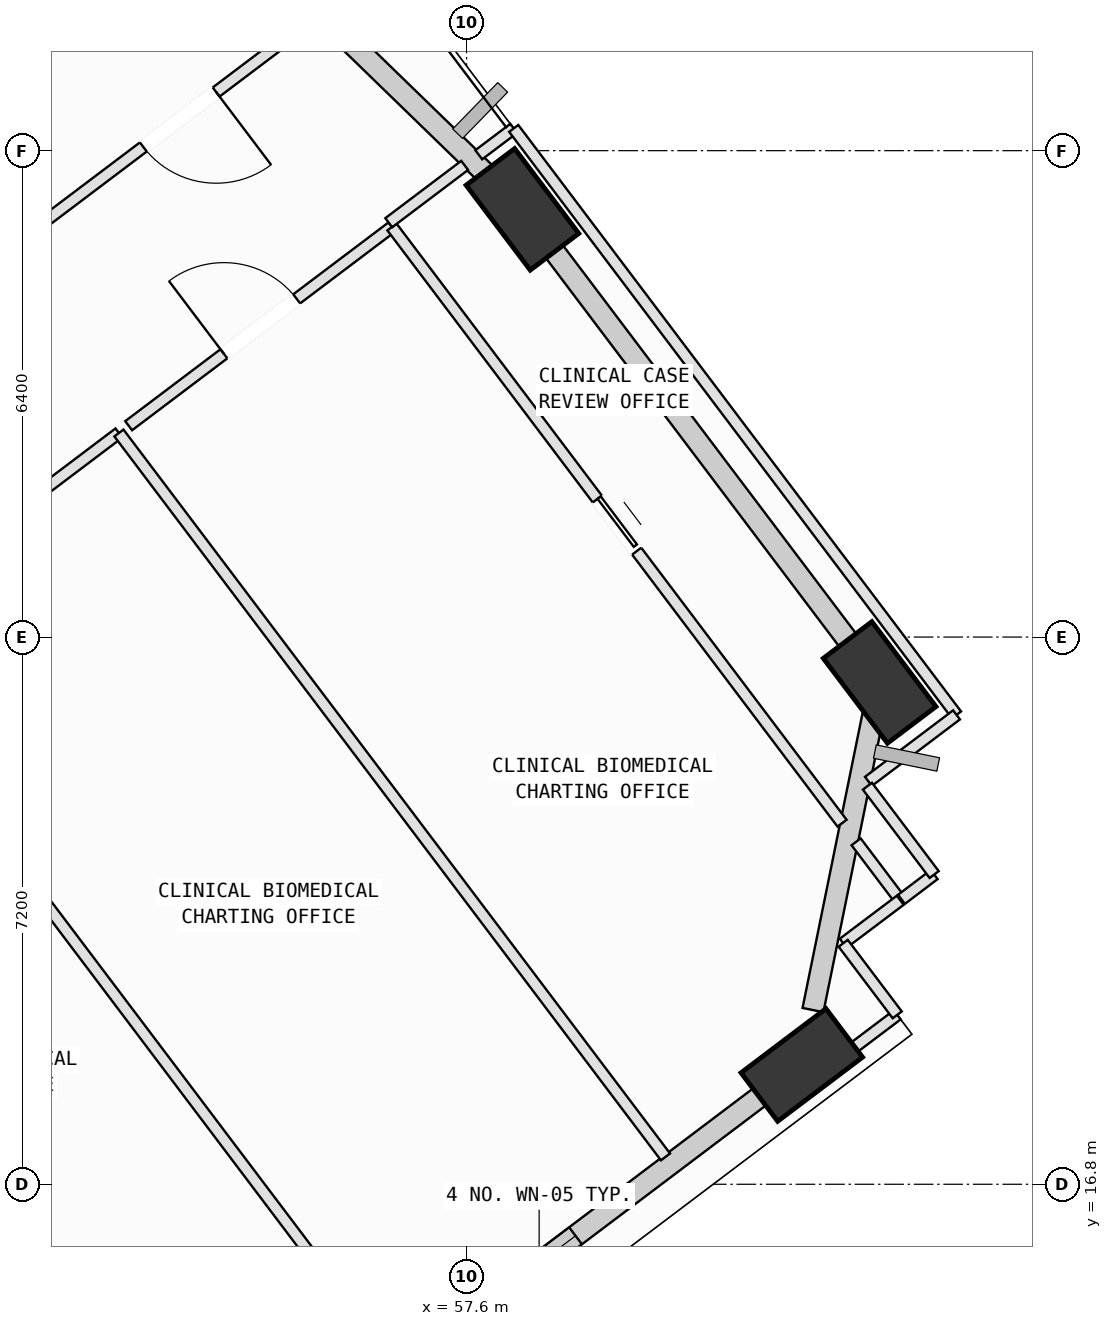
"""IFC4 building model, lengths in metres.
Left out: names, types, materials, properties, quantities, classifications, styles, units other than length and angle.
Written with IfcOpenShell. Run it as: python <this file> out.ifc"""

import sys

from ifc_helpers import new_model, si_unit, direction, frame, frame_2d, origin, origin_2d, place, context, subcontext, project, spatial, rectangle, extrude, element, fill, save


model = new_model("IFC4")
c1 = context("Model", 3, precision=1e-05, world=origin(), true_north=direction((0.0, 1.0)))
c2 = subcontext(c1, "Body", "Model", "MODEL_VIEW")
j1 = project(units=[si_unit("LENGTHUNIT", "METRE"), si_unit("PLANEANGLEUNIT", "RADIAN")], contexts=[c1])
p1 = place(None, origin())
s1 = spatial("IfcSite", under=j1, at=p1, CompositionType="ELEMENT")
p2 = place(p1, origin())
s2 = spatial("IfcBuilding", under=s1, at=p2, CompositionType="ELEMENT")
p3 = place(p2, frame((0.0, 0.0, 181.8)))
s3 = spatial("IfcBuildingStorey", under=s2, at=p3, CompositionType="ELEMENT", Elevation=181.8)
p4 = place(p3, frame((62.01, 18.369, 0.002), z_axis=(0.025473116254, 0.117176334771, 0.992784380879), x_axis=(-0.906962067297, -0.414969728359, 0.072249104005)))
e1 = element("IfcColumn", 1, at=p4, inside=s3, PredefinedType="COLUMN", context=c2, shape_type="SweptSolid", body=[
    extrude(rectangle(XDim=1.4, YDim=0.8, at=origin_2d()), origin(), (0.0, 0.0, 1.0), 4.025),
])
p5 = place(p3, frame((63.035, 23.403, 0.002), z_axis=(0.004729946846, 0.121159407662, 0.992621793806), x_axis=(0.571149109369, -0.815121976711, 0.09677219616)))
e2 = element("IfcColumn", 2, at=p5, inside=s3, PredefinedType="COLUMN", context=c2, shape_type="SweptSolid", body=[
    extrude(rectangle(XDim=1.4, YDim=0.8, at=origin_2d()), origin(), (0.0, 0.0, 1.0), 4.026),
])
p6 = place(p3, frame((58.335, 29.628, 0.002), z_axis=(-0.02078000134, 0.101834158611, 0.994584333118), x_axis=(0.749053879138, -0.657295694235, 0.082949722659)))
e3 = element("IfcColumn", 3, at=p6, inside=s3, PredefinedType="COLUMN", context=c2, shape_type="SweptSolid", body=[
    extrude(rectangle(XDim=1.4, YDim=0.8, at=origin_2d()), origin(), (0.0, 0.0, 1.0), 4.018),
])
p7 = place(p3, frame((61.781, 18.196, 0.0), z_axis=(0.0, 0.0, 1.0), x_axis=(-0.798123503481, -0.602493878136, 0.0)))
e4 = element("IfcWall", 4, at=p7, inside=s3, PredefinedType="SOLIDWALL", context=c2, shape_type="SweptSolid", body=[
    extrude(rectangle(XDim=6.242, YDim=0.28, at=frame_2d((3.121, 0.0))), origin(), (0.0, 0.0, 1.0), 3.265),
])
p8 = place(p7, frame((3.442, 0.0, 0.75)))
e5 = element("IfcOpeningElement", 5, at=p8, cuts=e4, PredefinedType="OPENING", context=c2, shape_type="SweptSolid", body=[
    extrude(rectangle(XDim=1.2, YDim=1.75, at=frame_2d((0.6, 0.875))), frame((0.0, 0.15, 0.0), z_axis=(0.0, -1.0, 0.0), x_axis=(1.0, 0.0, 0.0)), (0.0, 0.0, 1.0), 0.3),
])
p9 = place(p3, frame((62.984, 23.154, 0.0), z_axis=(0.0, 0.0, 1.0), x_axis=(-0.199365708504, -0.979925157485, 0.0)))
e6 = element("IfcWall", 6, at=p9, inside=s3, PredefinedType="SOLIDWALL", context=c2, shape_type="SweptSolid", body=[
    extrude(rectangle(XDim=4.145, YDim=0.28, at=frame_2d((2.073, 0.0))), origin(), (0.0, 0.0, 1.0), 3.265),
])
p10 = place(p3, frame((58.515, 29.389, 0.0), z_axis=(0.0, 0.0, 1.0), x_axis=(0.602492713857, -0.79812438238, 0.0)))
e7 = element("IfcWall", 7, at=p10, inside=s3, PredefinedType="SOLIDWALL", context=c2, shape_type="SweptSolid", body=[
    extrude(rectangle(XDim=6.84, YDim=0.28, at=frame_2d((3.42, 0.0))), origin(), (0.0, 0.0, 1.0), 3.265),
])
p11 = place(p3, frame((51.525, 36.24, 0.0), z_axis=(0.0, 0.0, 1.0), x_axis=(0.717404025955, -0.696657350169, 0.0)))
e8 = element("IfcWall", 8, at=p11, inside=s3, PredefinedType="SOLIDWALL", context=c2, shape_type="SweptSolid", body=[
    extrude(rectangle(XDim=8.838, YDim=0.28, at=frame_2d((4.419, 0.0))), origin(), (0.0, 0.0, 1.0), 3.265),
])
p12 = place(p3, frame((45.843, 21.262, 0.0), z_axis=(0.0, 0.0, 1.0), x_axis=(0.602530343885, -0.798095974616, 0.0)))
e9 = element("IfcWall", 9, at=p12, inside=s3, PredefinedType="PARTITIONING", context=c2, shape_type="SweptSolid", body=[
    extrude(rectangle(XDim=11.935, YDim=0.15, at=frame_2d((5.967, 0.0))), origin(), (0.0, 0.0, 1.0), 3.415),
])
p13 = place(p3, frame((49.435, 23.974, 0.0), z_axis=(0.0, 0.0, 1.0), x_axis=(0.60250679657, -0.798113751346, 0.0)))
e10 = element("IfcWall", 10, at=p13, inside=s3, PredefinedType="PARTITIONING", context=c2, shape_type="SweptSolid", body=[
    extrude(rectangle(XDim=12.28, YDim=0.15, at=frame_2d((6.14, 0.0))), origin(), (0.0, 0.0, 1.0), 3.78),
])
p14 = place(p3, frame((49.562, 24.07, 0.0), z_axis=(0.0, 0.0, 1.0), x_axis=(0.798105957369, 0.602517120763, 0.0)))
e11 = element("IfcWall", 11, at=p14, inside=s3, PredefinedType="PARTITIONING", context=c2, shape_type="SweptSolid", body=[
    extrude(rectangle(XDim=4.34, YDim=0.15, at=frame_2d((2.17, 0.0))), origin(), (0.0, 0.0, 1.0), 3.065),
])
p15 = place(p14, frame((1.57, 0.0, 0.0)))
e12 = element("IfcOpeningElement", 12, at=p15, cuts=e11, PredefinedType="OPENING", context=c2, shape_type="SweptSolid", body=[
    extrude(rectangle(XDim=1.2, YDim=2.15, at=frame_2d((0.6, 1.075))), frame((0.0, 0.085, 0.0), z_axis=(0.0, -1.0, 0.0), x_axis=(1.0, 0.0, 0.0)), (0.0, 0.0, 1.0), 0.17),
])
p16 = place(p3, frame((53.026, 26.685, 0.0), z_axis=(0.0, 0.0, 1.0), x_axis=(0.602533536667, -0.798093564184, 0.0)))
e13 = element("IfcWall", 13, at=p16, inside=s3, PredefinedType="PARTITIONING", context=c2, shape_type="SweptSolid", body=[
    extrude(rectangle(XDim=11.935, YDim=0.15, at=frame_2d((5.967, 0.0))), origin(), (0.0, 0.0, 1.0), 3.78),
])
p17 = place(p3, frame((63.266, 19.029, 0.0), z_axis=(0.0, 0.0, 1.0), x_axis=(-0.798365007662, -0.602173824191, 0.0)))
e14 = element("IfcWall", 14, at=p17, inside=s3, PredefinedType="PARTITIONING", context=c2, shape_type="SweptSolid", body=[
    extrude(rectangle(XDim=1.688, YDim=0.15, at=frame_2d((0.844, 0.0))), origin(), (0.0, 0.0, 1.0), 3.78),
])
p18 = place(p3, frame((53.154, 26.781, 0.0), z_axis=(0.0, 0.0, 1.0), x_axis=(0.798105957369, 0.602517120763, 0.0)))
e15 = element("IfcWall", 15, at=p18, inside=s3, PredefinedType="PARTITIONING", context=c2, shape_type="SweptSolid", body=[
    extrude(rectangle(XDim=4.34, YDim=0.15, at=frame_2d((2.17, 0.0))), origin(), (0.0, 0.0, 1.0), 3.065),
])
p19 = place(p18, frame((1.57, 0.0, 0.0)))
e16 = element("IfcOpeningElement", 16, at=p19, cuts=e15, PredefinedType="OPENING", context=c2, shape_type="SweptSolid", body=[
    extrude(rectangle(XDim=1.2, YDim=2.15, at=frame_2d((0.6, 1.075))), frame((0.0, 0.085, 0.0), z_axis=(0.0, -1.0, 0.0), x_axis=(1.0, 0.0, 0.0)), (0.0, 0.0, 1.0), 0.17),
])
p20 = place(p3, frame((56.618, 29.396, 0.0), z_axis=(0.0, 0.0, 1.0), x_axis=(0.602496773162, -0.798121318053, 0.0)))
e17 = element("IfcWall", 17, at=p20, inside=s3, PredefinedType="PARTITIONING", context=c2, shape_type="SweptSolid", body=[
    extrude(rectangle(XDim=9.829, YDim=0.15, at=frame_2d((4.915, 0.0))), origin(), (0.0, 0.0, 1.0), 3.78),
])
p21 = place(p20, frame((4.485, 0.0, 0.0)))
e18 = element("IfcOpeningElement", 18, at=p21, cuts=e17, PredefinedType="OPENING", context=c2, shape_type="SweptSolid", body=[
    extrude(rectangle(XDim=0.86, YDim=2.06, at=frame_2d((0.43, 1.03))), frame((0.0, 0.085, 0.0), z_axis=(0.0, -1.0, 0.0), x_axis=(1.0, 0.0, 0.0)), (0.0, 0.0, 1.0), 0.17),
])
p22 = place(p3, frame((62.725, 21.306, 0.0), z_axis=(0.0, 0.0, 1.0), x_axis=(0.60279365945, -0.797897113748, 0.0)))
e19 = element("IfcWall", 19, at=p22, inside=s3, PredefinedType="PARTITIONING", context=c2, shape_type="SweptSolid", body=[
    extrude(rectangle(XDim=0.964, YDim=0.15, at=frame_2d((0.482, 0.0))), origin(), (0.0, 0.0, 1.0), 3.78),
])
p23 = place(p3, frame((63.306, 20.537, 0.0), z_axis=(0.0, 0.0, 1.0), x_axis=(-0.798502270997, -0.601991796633, 0.0)))
e20 = element("IfcWall", 20, at=p23, inside=s3, PredefinedType="PARTITIONING", context=c2, shape_type="SweptSolid", body=[
    extrude(rectangle(XDim=0.94, YDim=0.15, at=frame_2d((0.47, 0.0))), origin(), (0.0, 0.0, 1.0), 3.78),
])
p24 = place(p3, frame((62.555, 19.971, 0.0), z_axis=(0.0, 0.0, 1.0), x_axis=(0.602578468566, -0.79805964014, 0.0)))
e21 = element("IfcWall", 21, at=p24, inside=s3, PredefinedType="PARTITIONING", context=c2, shape_type="SweptSolid", body=[
    extrude(rectangle(XDim=1.18, YDim=0.15, at=frame_2d((0.59, 0.0))), origin(), (0.0, 0.0, 1.0), 3.78),
])
p25 = place(p3, frame((55.585, 32.138, 0.0), z_axis=(0.0, 0.0, 1.0), x_axis=(-0.798095178634, -0.60253139822, 0.0)))
e22 = element("IfcWall", 22, at=p25, inside=s3, PredefinedType="PARTITIONING", context=c2, shape_type="SweptSolid", body=[
    extrude(rectangle(XDim=4.408, YDim=0.15, at=frame_2d((2.204, 0.0))), origin(), (0.0, 0.0, 1.0), 3.78),
])
p26 = place(p25, frame((1.604, 0.0, 0.0)))
e23 = element("IfcOpeningElement", 23, at=p26, cuts=e22, PredefinedType="OPENING", context=c2, shape_type="SweptSolid", body=[
    extrude(rectangle(XDim=1.2, YDim=2.15, at=frame_2d((0.6, 1.075))), frame((0.0, 0.085, 0.0), z_axis=(0.0, -1.0, 0.0), x_axis=(1.0, 0.0, 0.0)), (0.0, 0.0, 1.0), 0.17),
])
p27 = place(p3, frame((63.752, 20.875, 0.0), z_axis=(0.0, 0.0, 1.0), x_axis=(-0.796894093215, -0.604119031483, 0.0)))
e24 = element("IfcWall", 24, at=p27, inside=s3, PredefinedType="PARTITIONING", context=c2, shape_type="SweptSolid", body=[
    extrude(rectangle(XDim=0.54, YDim=0.15, at=frame_2d((0.27, 0.0))), origin(), (0.0, 0.0, 1.0), 3.78),
])
p28 = place(p3, frame((56.576, 29.452, 0.0), z_axis=(0.0, 0.0, 1.0), x_axis=(0.798123673532, 0.602493652869, 0.0)))
e25 = element("IfcWall", 25, at=p28, inside=s3, PredefinedType="PARTITIONING", context=c2, shape_type="SweptSolid", body=[
    extrude(rectangle(XDim=1.252, YDim=0.15, at=frame_2d((0.626, 0.0))), origin(), (0.0, 0.0, 1.0), 3.065),
])
p29 = place(p3, frame((57.76, 30.346, 0.0), z_axis=(0.0, 0.0, 1.0), x_axis=(0.798166088463, 0.602437461674, 0.0)))
e26 = element("IfcWall", 26, at=p29, inside=s3, PredefinedType="PARTITIONING", context=c2, shape_type="SweptSolid", body=[
    extrude(rectangle(XDim=0.576, YDim=0.15, at=frame_2d((0.288, 0.0))), origin(), (0.0, 0.0, 1.0), 3.78),
])
p30 = place(p3, frame((58.22, 30.693, 0.0), z_axis=(0.0, 0.0, 1.0), x_axis=(0.60252193275, -0.798102324615, 0.0)))
e27 = element("IfcWall", 27, at=p30, inside=s3, PredefinedType="PARTITIONING", context=c2, shape_type="SweptSolid", body=[
    extrude(rectangle(XDim=9.669, YDim=0.15, at=frame_2d((4.834, 0.0))), origin(), (0.0, 0.0, 1.0), 3.265),
])
p31 = place(p3, frame((64.046, 22.976, 0.0), z_axis=(0.0, 0.0, 1.0), x_axis=(-0.798079317633, -0.602552406656, 0.0)))
e28 = element("IfcWall", 28, at=p31, inside=s3, PredefinedType="PARTITIONING", context=c2, shape_type="SweptSolid", body=[
    extrude(rectangle(XDim=1.452, YDim=0.15, at=frame_2d((0.726, 0.0))), origin(), (0.0, 0.0, 1.0), 3.78),
])
p32 = place(p3, frame((62.874, 22.038, 0.0), z_axis=(0.0, 0.0, 1.0), x_axis=(0.602463294748, -0.798146589594, 0.0)))
e29 = element("IfcWall", 29, at=p32, inside=s3, PredefinedType="PARTITIONING", context=c2, shape_type="SweptSolid", body=[
    extrude(rectangle(XDim=1.457, YDim=0.15, at=frame_2d((0.729, 0.0))), origin(), (0.0, 0.0, 1.0), 3.78),
])
p33 = place(p8, origin())
e30 = element("IfcWindow", 30, at=p33, inside=s3, PartitioningType="SINGLE_PANEL", PredefinedType="WINDOW", context=c2, shape_type="SweptSolid", body=[
    extrude(rectangle(XDim=1.2, YDim=1.75, at=frame_2d((0.6, 0.875))), frame((0.0, 0.03, 0.0), z_axis=(0.0, -1.0, 0.0), x_axis=(1.0, 0.0, 0.0)), (0.0, 0.0, 1.0), 0.06),
])
fill(e5, e30)
p34 = place(p19, origin())
e31 = element("IfcDoor", 31, at=p34, inside=s3, OperationType="SINGLE_SWING_LEFT", PredefinedType="DOOR", context=c2, shape_type="SweptSolid", body=[
    extrude(rectangle(XDim=1.2, YDim=2.15, at=frame_2d((0.6, 1.075))), frame((0.0, 0.025, 0.0), z_axis=(0.0, -1.0, 0.0), x_axis=(1.0, 0.0, 0.0)), (0.0, 0.0, 1.0), 0.05),
])
fill(e16, e31)
p35 = place(p26, origin())
e32 = element("IfcDoor", 32, at=p35, inside=s3, OperationType="SINGLE_SWING_LEFT", PredefinedType="DOOR", context=c2, shape_type="SweptSolid", body=[
    extrude(rectangle(XDim=1.2, YDim=2.15, at=frame_2d((0.6, 1.075))), frame((0.0, 0.025, 0.0), z_axis=(0.0, -1.0, 0.0), x_axis=(1.0, 0.0, 0.0)), (0.0, 0.0, 1.0), 0.05),
])
fill(e23, e32)
p36 = place(p21, origin())
e33 = element("IfcDoor", 33, at=p36, inside=s3, OperationType="SLIDING_TO_LEFT", PredefinedType="DOOR", context=c2, shape_type="SweptSolid", body=[
    extrude(rectangle(XDim=0.86, YDim=2.06, at=frame_2d((0.43, 1.03))), frame((0.0, 0.025, 0.0), z_axis=(0.0, -1.0, 0.0), x_axis=(1.0, 0.0, 0.0)), (0.0, 0.0, 1.0), 0.05),
])
fill(e18, e33)
save(model, sys.argv[1])
